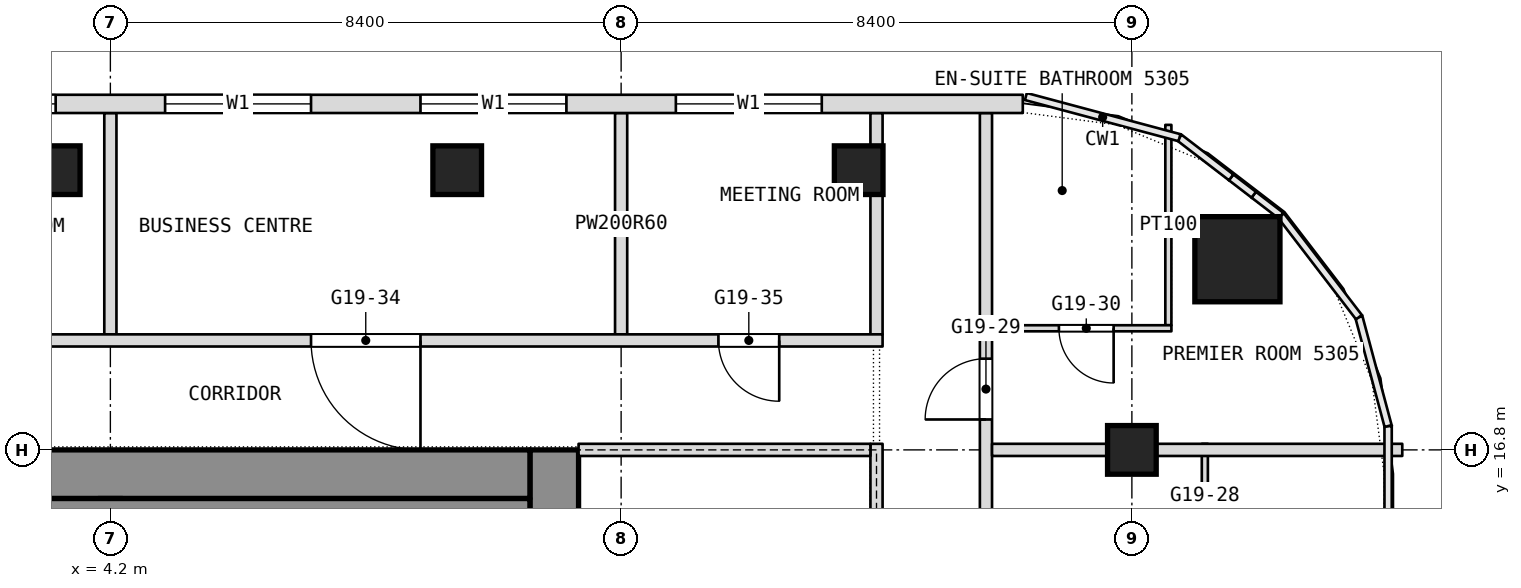
"""IFC4 building model, lengths in metres.
Left out: names, types, materials, properties, quantities, classifications, styles, units other than length and angle.
Written with IfcOpenShell. Run it as: python <this file> out.ifc"""

import sys

from ifc_helpers import new_model, si_unit, direction, frame, frame_2d, origin, origin_2d, place, context, subcontext, project, spatial, rectangle, extrude, element, fill, save


model = new_model("IFC4")
c1 = context("Model", 3, precision=1e-05, world=origin(), true_north=direction((0.0, 1.0)))
c2 = subcontext(c1, "Body", "Model", "MODEL_VIEW")
j1 = project(units=[si_unit("LENGTHUNIT", "METRE"), si_unit("PLANEANGLEUNIT", "RADIAN")], contexts=[c1])
p1 = place(None, origin())
s1 = spatial("IfcSite", under=j1, at=p1, CompositionType="ELEMENT")
p2 = place(p1, origin())
s2 = spatial("IfcBuilding", under=s1, at=p2, CompositionType="ELEMENT")
p3 = place(p2, frame((0.0, 0.0, 227.3)))
s3 = spatial("IfcBuildingStorey", under=s2, at=p3, CompositionType="ELEMENT", Elevation=227.3)
p4 = place(p3, frame((11.5, 0.0, 0.0), z_axis=(0.0, 0.0, 1.0), x_axis=(0.0, 1.0, 0.0)))
e1 = element("IfcWall", 1, at=p4, inside=s3, PredefinedType="SHEAR", context=c2, shape_type="SweptSolid", body=[
    extrude(rectangle(XDim=16.8, YDim=0.8, at=frame_2d((8.4, 0.0))), origin(), (0.0, 0.0, 1.0), 3.6),
])
p5 = place(p4, frame((2.3, 0.0, 0.0)))
e2 = element("IfcOpeningElement", 2, at=p5, cuts=e1, PredefinedType="OPENING", context=c2, shape_type="SweptSolid", body=[
    extrude(rectangle(XDim=1.1, YDim=2.1, at=frame_2d((0.55, 1.05))), frame((0.0, 0.4, 0.0), z_axis=(0.0, -1.0, 0.0), x_axis=(1.0, 0.0, 0.0)), (0.0, 0.0, 1.0), 0.8),
])
p6 = place(p4, frame((4.85, 0.0, 0.0)))
e3 = element("IfcOpeningElement", 3, at=p6, cuts=e1, PredefinedType="OPENING", context=c2, shape_type="SweptSolid", body=[
    extrude(rectangle(XDim=1.1, YDim=2.1, at=frame_2d((0.55, 1.05))), frame((0.0, 0.4, 0.0), z_axis=(0.0, -1.0, 0.0), x_axis=(1.0, 0.0, 0.0)), (0.0, 0.0, 1.0), 0.8),
])
p7 = place(p4, frame((6.825, 0.0, 0.0)))
e4 = element("IfcOpeningElement", 4, at=p7, cuts=e1, PredefinedType="OPENING", context=c2, shape_type="SweptSolid", body=[
    extrude(rectangle(XDim=1.2, YDim=2.1, at=frame_2d((0.6, 1.05))), frame((0.0, 0.4, 0.0), z_axis=(0.0, -1.0, 0.0), x_axis=(1.0, 0.0, 0.0)), (0.0, 0.0, 1.0), 0.8),
])
p8 = place(p4, frame((13.4, 0.0, 0.0)))
e5 = element("IfcOpeningElement", 5, at=p8, cuts=e1, PredefinedType="OPENING", context=c2, shape_type="SweptSolid", body=[
    extrude(rectangle(XDim=1.1, YDim=2.1, at=frame_2d((0.55, 1.05))), frame((0.0, 0.4, 0.0), z_axis=(0.0, -1.0, 0.0), x_axis=(1.0, 0.0, 0.0)), (0.0, 0.0, 1.0), 0.8),
])
p9 = place(p4, frame((10.85, 0.0, 0.0)))
e6 = element("IfcOpeningElement", 6, at=p9, cuts=e1, PredefinedType="OPENING", context=c2, shape_type="SweptSolid", body=[
    extrude(rectangle(XDim=1.1, YDim=2.1, at=frame_2d((0.55, 1.05))), frame((0.0, 0.4, 0.0), z_axis=(0.0, -1.0, 0.0), x_axis=(1.0, 0.0, 0.0)), (0.0, 0.0, 1.0), 0.8),
])
p10 = place(p4, frame((8.775, 0.0, 0.0)))
e7 = element("IfcOpeningElement", 7, at=p10, cuts=e1, PredefinedType="OPENING", context=c2, shape_type="SweptSolid", body=[
    extrude(rectangle(XDim=1.2, YDim=2.1, at=frame_2d((0.6, 1.05))), frame((0.0, 0.4, 0.0), z_axis=(0.0, -1.0, 0.0), x_axis=(1.0, 0.0, 0.0)), (0.0, 0.0, 1.0), 0.8),
])
p11 = place(p3, frame((-11.1, 16.4, 0.0), z_axis=(0.0, 0.0, 1.0), x_axis=(1.0, 0.0, 0.0)))
e8 = element("IfcWall", 8, at=p11, inside=s3, PredefinedType="SHEAR", context=c2, shape_type="SweptSolid", body=[
    extrude(rectangle(XDim=22.2, YDim=0.8, at=frame_2d((11.1, 0.0))), origin(), (0.0, 0.0, 1.0), 3.6),
])
p12 = place(p3, frame((4.2, 0.8, 0.0), z_axis=(0.0, 0.0, 1.0), x_axis=(0.0, 1.0, 0.0)))
e9 = element("IfcWall", 9, at=p12, inside=s3, PredefinedType="SHEAR", context=c2, shape_type="SweptSolid", body=[
    extrude(rectangle(XDim=15.2, YDim=0.4, at=frame_2d((7.6, 0.0))), origin(), (0.0, 0.0, 1.0), 3.6),
])
p13 = place(p12, frame((5.95, 0.0, 0.0)))
e10 = element("IfcOpeningElement", 10, at=p13, cuts=e9, PredefinedType="OPENING", context=c2, shape_type="SweptSolid", body=[
    extrude(rectangle(XDim=1.2, YDim=2.1, at=frame_2d((0.6, 1.05))), frame((0.0, 0.2, 0.0), z_axis=(0.0, -1.0, 0.0), x_axis=(1.0, 0.0, 0.0)), (0.0, 0.0, 1.0), 0.4),
])
p14 = place(p3, frame((22.736, 19.936, 0.0), z_axis=(0.0, 0.0, 1.0), x_axis=(1.0, 0.0, 0.0)))
e11 = element("IfcColumn", 11, at=p14, inside=s3, PredefinedType="COLUMN", context=c2, shape_type="SweptSolid", body=[
    extrude(rectangle(XDim=1.4, YDim=1.4, at=origin_2d()), origin(), (0.0, 0.0, 1.0), 3.6),
])
for number, where, z_axis, x_axis in (
    (12, (21.0, 16.8, 0.0), (0.0, 0.0, 1.0), (1.0, 0.0, 0.0)),
    (13, (3.302, 21.4, 0.0), (0.0, 0.0, 1.0), (1.0, 0.0, 0.0)),
    (14, (9.904, 21.4, 0.0), (0.0, 0.0, 1.0), (1.0, 0.0, 0.0)),
    (15, (16.507, 21.4, 0.0), (0.0, 0.0, 1.0), (1.0, 0.0, 0.0)),
):
    element("IfcColumn", number, at=place(p3, frame(where, z_axis=z_axis, x_axis=x_axis)), inside=s3, PredefinedType="COLUMN", context=c2, shape_type="SweptSolid", body=[
        extrude(rectangle(XDim=0.8, YDim=0.8, at=origin_2d()), origin(), (0.0, 0.0, 1.0), 3.6),
    ])
p15 = place(p3, frame((22.2, 14.45, 0.0), z_axis=(0.0, 0.0, 1.0), x_axis=(0.0, 1.0, 0.0)))
e16 = element("IfcWall", 16, at=p15, inside=s3, PredefinedType="PARTITIONING", context=c2, shape_type="SweptSolid", body=[
    extrude(rectangle(XDim=2.45, YDim=0.1, at=frame_2d((1.225, 0.0))), origin(), (0.0, 0.0, 1.0), 3.34),
])
p16 = place(p15, frame((0.15, 0.0, 0.0)))
e17 = element("IfcOpeningElement", 17, at=p16, cuts=e16, PredefinedType="OPENING", context=c2, shape_type="SweptSolid", body=[
    extrude(rectangle(XDim=0.9, YDim=2.1, at=frame_2d((0.45, 1.05))), frame((0.0, 0.05, 0.0), z_axis=(0.0, -1.0, 0.0), x_axis=(1.0, 0.0, 0.0)), (0.0, 0.0, 1.0), 0.1),
])
p17 = place(p3, frame((21.6, 18.85, 0.0), z_axis=(0.0, 0.0, 1.0), x_axis=(0.0, 1.0, 0.0)))
e18 = element("IfcWall", 18, at=p17, inside=s3, PredefinedType="PARTITIONING", context=c2, shape_type="SweptSolid", body=[
    extrude(rectangle(XDim=3.295, YDim=0.1, at=frame_2d((1.647, 0.0))), origin(), (0.0, 0.0, 1.0), 3.34),
])
p18 = place(p3, frame((18.6, -26.751, 0.0), z_axis=(0.0, 0.0, 1.0), x_axis=(0.0, 1.0, 0.0)))
e19 = element("IfcWall", 19, at=p18, inside=s3, PredefinedType="PARTITIONING", context=c2, shape_type="SweptSolid", body=[
    extrude(rectangle(XDim=49.091, YDim=0.2, at=frame_2d((24.545, 0.0))), origin(), (0.0, 0.0, 1.0), 3.34),
])
p19 = place(p18, frame((4.226, 0.0, 0.0)))
e20 = element("IfcOpeningElement", 20, at=p19, cuts=e19, PredefinedType="OPENING", context=c2, shape_type="SweptSolid", body=[
    extrude(rectangle(XDim=1.8, YDim=2.1, at=frame_2d((0.9, 1.05))), frame((0.0, 0.1, 0.0), z_axis=(0.0, -1.0, 0.0), x_axis=(1.0, 0.0, 0.0)), (0.0, 0.0, 1.0), 0.2),
])
p20 = place(p18, frame((10.351, 0.0, 0.0)))
e21 = element("IfcOpeningElement", 21, at=p20, cuts=e19, PredefinedType="OPENING", context=c2, shape_type="SweptSolid", body=[
    extrude(rectangle(XDim=1.0, YDim=2.1, at=frame_2d((0.5, 1.05))), frame((0.0, 0.1, 0.0), z_axis=(0.0, -1.0, 0.0), x_axis=(1.0, 0.0, 0.0)), (0.0, 0.0, 1.0), 0.2),
])
p21 = place(p18, frame((16.951, 0.0, 0.0)))
e22 = element("IfcOpeningElement", 22, at=p21, cuts=e19, PredefinedType="OPENING", context=c2, shape_type="SweptSolid", body=[
    extrude(rectangle(XDim=1.0, YDim=2.1, at=frame_2d((0.5, 1.05))), frame((0.0, 0.1, 0.0), z_axis=(0.0, -1.0, 0.0), x_axis=(1.0, 0.0, 0.0)), (0.0, 0.0, 1.0), 0.2),
])
p22 = place(p18, frame((22.051, 0.0, 0.0)))
e23 = element("IfcOpeningElement", 23, at=p22, cuts=e19, PredefinedType="OPENING", context=c2, shape_type="SweptSolid", body=[
    extrude(rectangle(XDim=1.1, YDim=2.1, at=frame_2d((0.55, 1.05))), frame((0.0, 0.1, 0.0), z_axis=(0.0, -1.0, 0.0), x_axis=(1.0, 0.0, 0.0)), (0.0, 0.0, 1.0), 0.2),
])
p23 = place(p18, frame((30.051, 0.0, 0.0)))
e24 = element("IfcOpeningElement", 24, at=p23, cuts=e19, PredefinedType="OPENING", context=c2, shape_type="SweptSolid", body=[
    extrude(rectangle(XDim=1.8, YDim=2.1, at=frame_2d((0.9, 1.05))), frame((0.0, 0.1, 0.0), z_axis=(0.0, -1.0, 0.0), x_axis=(1.0, 0.0, 0.0)), (0.0, 0.0, 1.0), 0.2),
])
p24 = place(p18, frame((38.851, 0.0, 0.0)))
e25 = element("IfcOpeningElement", 25, at=p24, cuts=e19, PredefinedType="OPENING", context=c2, shape_type="SweptSolid", body=[
    extrude(rectangle(XDim=1.1, YDim=2.1, at=frame_2d((0.55, 1.05))), frame((0.0, 0.1, 0.0), z_axis=(0.0, -1.0, 0.0), x_axis=(1.0, 0.0, 0.0)), (0.0, 0.0, 1.0), 0.2),
])
p25 = place(p18, frame((44.051, 0.0, 0.0)))
e26 = element("IfcOpeningElement", 26, at=p25, cuts=e19, PredefinedType="OPENING", context=c2, shape_type="SweptSolid", body=[
    extrude(rectangle(XDim=1.0, YDim=2.1, at=frame_2d((0.5, 1.05))), frame((0.0, 0.1, 0.0), z_axis=(0.0, -1.0, 0.0), x_axis=(1.0, 0.0, 0.0)), (0.0, 0.0, 1.0), 0.2),
])
for number, where, z_axis, x_axis in (
    (27, (16.8, 18.7, 0.0), (0.0, 0.0, 1.0), (0.0, 1.0, 0.0)),
    (28, (12.6, 18.7, 0.0), (0.0, 0.0, 1.0), (0.0, 1.0, 0.0)),
    (29, (4.2, 18.7, 0.0), (0.0, 0.0, 1.0), (0.0, 1.0, 0.0)),
):
    element("IfcWall", number, at=place(p3, frame(where, z_axis=z_axis, x_axis=x_axis)), inside=s3, PredefinedType="PARTITIONING", context=c2, shape_type="SweptSolid", body=[
        extrude(rectangle(XDim=3.64, YDim=0.2, at=frame_2d((1.82, 0.0))), origin(), (0.0, 0.0, 1.0), 3.34),
    ])
p26 = place(p3, frame((18.7, 16.8, 0.0), z_axis=(0.0, 0.0, 1.0), x_axis=(1.0, 0.0, 0.0)))
e30 = element("IfcWall", 30, at=p26, inside=s3, PredefinedType="PARTITIONING", context=c2, shape_type="SweptSolid", body=[
    extrude(rectangle(XDim=6.747, YDim=0.2, at=frame_2d((3.374, 0.0))), origin(), (0.0, 0.0, 1.0), 2.94),
])
p27 = place(p3, frame((-16.9, 18.6, 0.0), z_axis=(0.0, 0.0, 1.0), x_axis=(1.0, 0.0, 0.0)))
e31 = element("IfcWall", 31, at=p27, inside=s3, PredefinedType="PARTITIONING", context=c2, shape_type="SweptSolid", body=[
    extrude(rectangle(XDim=33.8, YDim=0.2, at=frame_2d((16.9, 0.0))), origin(), (0.0, 0.0, 1.0), 3.34),
])
p28 = place(p27, frame((1.7, 0.0, 0.0)))
e32 = element("IfcOpeningElement", 32, at=p28, cuts=e31, PredefinedType="OPENING", context=c2, shape_type="SweptSolid", body=[
    extrude(rectangle(XDim=1.0, YDim=2.1, at=frame_2d((0.5, 1.05))), frame((0.0, 0.1, 0.0), z_axis=(0.0, -1.0, 0.0), x_axis=(1.0, 0.0, 0.0)), (0.0, 0.0, 1.0), 0.2),
])
p29 = place(p27, frame((7.6, 0.0, 0.0)))
e33 = element("IfcOpeningElement", 33, at=p29, cuts=e31, PredefinedType="OPENING", context=c2, shape_type="SweptSolid", body=[
    extrude(rectangle(XDim=1.8, YDim=2.1, at=frame_2d((0.9, 1.05))), frame((0.0, 0.1, 0.0), z_axis=(0.0, -1.0, 0.0), x_axis=(1.0, 0.0, 0.0)), (0.0, 0.0, 1.0), 0.2),
])
p30 = place(p27, frame((16.0, 0.0, 0.0)))
e34 = element("IfcOpeningElement", 34, at=p30, cuts=e31, PredefinedType="OPENING", context=c2, shape_type="SweptSolid", body=[
    extrude(rectangle(XDim=1.8, YDim=2.1, at=frame_2d((0.9, 1.05))), frame((0.0, 0.1, 0.0), z_axis=(0.0, -1.0, 0.0), x_axis=(1.0, 0.0, 0.0)), (0.0, 0.0, 1.0), 0.2),
])
p31 = place(p27, frame((24.4, 0.0, 0.0)))
e35 = element("IfcOpeningElement", 35, at=p31, cuts=e31, PredefinedType="OPENING", context=c2, shape_type="SweptSolid", body=[
    extrude(rectangle(XDim=1.8, YDim=2.1, at=frame_2d((0.9, 1.05))), frame((0.0, 0.1, 0.0), z_axis=(0.0, -1.0, 0.0), x_axis=(1.0, 0.0, 0.0)), (0.0, 0.0, 1.0), 0.2),
])
p32 = place(p27, frame((31.1, 0.0, 0.0)))
e36 = element("IfcOpeningElement", 36, at=p32, cuts=e31, PredefinedType="OPENING", context=c2, shape_type="SweptSolid", body=[
    extrude(rectangle(XDim=1.0, YDim=2.1, at=frame_2d((0.5, 1.05))), frame((0.0, 0.1, 0.0), z_axis=(0.0, -1.0, 0.0), x_axis=(1.0, 0.0, 0.0)), (0.0, 0.0, 1.0), 0.2),
])
p33 = place(p3, frame((18.7, 18.8, 0.0), z_axis=(0.0, 0.0, 1.0), x_axis=(1.0, 0.0, 0.0)))
e37 = element("IfcWall", 37, at=p33, inside=s3, PredefinedType="PARTITIONING", context=c2, shape_type="SweptSolid", body=[
    extrude(rectangle(XDim=2.95, YDim=0.1, at=frame_2d((1.475, 0.0))), origin(), (0.0, 0.0, 1.0), 3.34),
])
p34 = place(p33, frame((1.1, 0.0, 0.0)))
e38 = element("IfcOpeningElement", 38, at=p34, cuts=e37, PredefinedType="OPENING", context=c2, shape_type="SweptSolid", body=[
    extrude(rectangle(XDim=0.9, YDim=2.1, at=frame_2d((0.45, 1.05))), frame((0.0, 0.05, 0.0), z_axis=(0.0, -1.0, 0.0), x_axis=(1.0, 0.0, 0.0)), (0.0, 0.0, 1.0), 0.1),
])
p35 = place(p3, frame((19.206, 22.49, 0.0), z_axis=(0.0, 0.0, 1.0), x_axis=(-1.0, 0.0, 0.0)))
e39 = element("IfcWall", 39, at=p35, inside=s3, PredefinedType="NOTDEFINED", context=c2, shape_type="SweptSolid", body=[
    extrude(rectangle(XDim=38.412, YDim=0.3, at=frame_2d((19.206, 0.0))), origin(), (0.0, 0.0, 1.0), 3.6),
])
p36 = place(p35, frame((3.306, 0.0, 0.9)))
e40 = element("IfcOpeningElement", 40, at=p36, cuts=e39, PredefinedType="OPENING", context=c2, shape_type="SweptSolid", body=[
    extrude(rectangle(XDim=2.4, YDim=2.1, at=frame_2d((1.2, 1.05))), frame((0.0, 0.15, 0.0), z_axis=(0.0, -1.0, 0.0), x_axis=(1.0, 0.0, 0.0)), (0.0, 0.0, 1.0), 0.3),
])
p37 = place(p35, frame((7.506, 0.0, 0.9)))
e41 = element("IfcOpeningElement", 41, at=p37, cuts=e39, PredefinedType="OPENING", context=c2, shape_type="SweptSolid", body=[
    extrude(rectangle(XDim=2.4, YDim=2.1, at=frame_2d((1.2, 1.05))), frame((0.0, 0.15, 0.0), z_axis=(0.0, -1.0, 0.0), x_axis=(1.0, 0.0, 0.0)), (0.0, 0.0, 1.0), 0.3),
])
p38 = place(p35, frame((11.706, 0.0, 0.9)))
e42 = element("IfcOpeningElement", 42, at=p38, cuts=e39, PredefinedType="OPENING", context=c2, shape_type="SweptSolid", body=[
    extrude(rectangle(XDim=2.4, YDim=2.1, at=frame_2d((1.2, 1.05))), frame((0.0, 0.15, 0.0), z_axis=(0.0, -1.0, 0.0), x_axis=(1.0, 0.0, 0.0)), (0.0, 0.0, 1.0), 0.3),
])
p39 = place(p35, frame((15.906, 0.0, 0.9)))
e43 = element("IfcOpeningElement", 43, at=p39, cuts=e39, PredefinedType="OPENING", context=c2, shape_type="SweptSolid", body=[
    extrude(rectangle(XDim=2.4, YDim=2.1, at=frame_2d((1.2, 1.05))), frame((0.0, 0.15, 0.0), z_axis=(0.0, -1.0, 0.0), x_axis=(1.0, 0.0, 0.0)), (0.0, 0.0, 1.0), 0.3),
])
p40 = place(p35, frame((20.106, 0.0, 0.9)))
e44 = element("IfcOpeningElement", 44, at=p40, cuts=e39, PredefinedType="OPENING", context=c2, shape_type="SweptSolid", body=[
    extrude(rectangle(XDim=2.4, YDim=2.1, at=frame_2d((1.2, 1.05))), frame((0.0, 0.15, 0.0), z_axis=(0.0, -1.0, 0.0), x_axis=(1.0, 0.0, 0.0)), (0.0, 0.0, 1.0), 0.3),
])
p41 = place(p35, frame((24.306, 0.0, 0.9)))
e45 = element("IfcOpeningElement", 45, at=p41, cuts=e39, PredefinedType="OPENING", context=c2, shape_type="SweptSolid", body=[
    extrude(rectangle(XDim=2.4, YDim=2.1, at=frame_2d((1.2, 1.05))), frame((0.0, 0.15, 0.0), z_axis=(0.0, -1.0, 0.0), x_axis=(1.0, 0.0, 0.0)), (0.0, 0.0, 1.0), 0.3),
])
p42 = place(p35, frame((28.506, 0.0, 0.9)))
e46 = element("IfcOpeningElement", 46, at=p42, cuts=e39, PredefinedType="OPENING", context=c2, shape_type="SweptSolid", body=[
    extrude(rectangle(XDim=2.4, YDim=2.1, at=frame_2d((1.2, 1.05))), frame((0.0, 0.15, 0.0), z_axis=(0.0, -1.0, 0.0), x_axis=(1.0, 0.0, 0.0)), (0.0, 0.0, 1.0), 0.3),
])
p43 = place(p35, frame((32.706, 0.0, 0.9)))
e47 = element("IfcOpeningElement", 47, at=p43, cuts=e39, PredefinedType="OPENING", context=c2, shape_type="SweptSolid", body=[
    extrude(rectangle(XDim=2.4, YDim=2.1, at=frame_2d((1.2, 1.05))), frame((0.0, 0.15, 0.0), z_axis=(0.0, -1.0, 0.0), x_axis=(1.0, 0.0, 0.0)), (0.0, 0.0, 1.0), 0.3),
])
p44 = place(p3, frame((-11.1, 15.65, 0.0), z_axis=(0.0, 0.0, 1.0), x_axis=(1.0, 0.0, 0.0)))
e48 = element("IfcWall", 48, at=p44, inside=s3, PredefinedType="PARTITIONING", context=c2, shape_type="SweptSolid", body=[
    extrude(rectangle(XDim=22.2, YDim=0.7, at=frame_2d((11.1, 0.0))), origin(), (0.0, 0.0, 1.0), 3.34),
])
p45 = place(p3, frame((16.8, -0.1, 0.0), z_axis=(0.0, 0.0, 1.0), x_axis=(0.0, 1.0, 0.0)))
e49 = element("IfcWall", 49, at=p45, inside=s3, PredefinedType="PARTITIONING", context=c2, shape_type="SweptSolid", body=[
    extrude(rectangle(XDim=17.0, YDim=0.2, at=frame_2d((8.5, 0.0))), origin(), (0.0, 0.0, 1.0), 3.34),
])
p46 = place(p45, frame((2.2, 0.0, 0.0)))
e50 = element("IfcOpeningElement", 50, at=p46, cuts=e49, PredefinedType="OPENING", context=c2, shape_type="SweptSolid", body=[
    extrude(rectangle(XDim=1.8, YDim=2.1, at=frame_2d((0.9, 1.05))), frame((0.0, 0.1, 0.0), z_axis=(0.0, -1.0, 0.0), x_axis=(1.0, 0.0, 0.0)), (0.0, 0.0, 1.0), 0.2),
])
p47 = place(p45, frame((13.0, 0.0, 0.0)))
e51 = element("IfcOpeningElement", 51, at=p47, cuts=e49, PredefinedType="OPENING", context=c2, shape_type="SweptSolid", body=[
    extrude(rectangle(XDim=1.8, YDim=2.1, at=frame_2d((0.9, 1.05))), frame((0.0, 0.1, 0.0), z_axis=(0.0, -1.0, 0.0), x_axis=(1.0, 0.0, 0.0)), (0.0, 0.0, 1.0), 0.2),
])
p48 = place(p3, frame((11.9, 16.8, 0.0), z_axis=(0.0, 0.0, 1.0), x_axis=(1.0, 0.0, 0.0)))
e52 = element("IfcWall", 52, at=p48, inside=s3, PredefinedType="PARTITIONING", context=c2, shape_type="SweptSolid", body=[
    extrude(rectangle(XDim=4.8, YDim=0.2, at=frame_2d((2.4, 0.0))), origin(), (0.0, 0.0, 1.0), 2.94),
])
p49 = place(p25, origin())
e53 = element("IfcDoor", 53, at=p49, inside=s3, OperationType="SINGLE_SWING_LEFT", PredefinedType="DOOR", context=c2, shape_type="SweptSolid", body=[
    extrude(rectangle(XDim=1.0, YDim=2.1, at=frame_2d((0.5, 1.05))), frame((0.0, 0.025, 0.0), z_axis=(0.0, -1.0, 0.0), x_axis=(1.0, 0.0, 0.0)), (0.0, 0.0, 1.0), 0.05),
])
fill(e26, e53)
p50 = place(p31, origin())
e54 = element("IfcDoor", 54, at=p50, inside=s3, OperationType="DOUBLE_DOOR_SINGLE_SWING", PredefinedType="DOOR", context=c2, shape_type="SweptSolid", body=[
    extrude(rectangle(XDim=1.8, YDim=2.1, at=frame_2d((0.9, 1.05))), frame((0.0, 0.025, 0.0), z_axis=(0.0, -1.0, 0.0), x_axis=(1.0, 0.0, 0.0)), (0.0, 0.0, 1.0), 0.05),
])
fill(e35, e54)
p51 = place(p32, origin())
e55 = element("IfcDoor", 55, at=p51, inside=s3, OperationType="SINGLE_SWING_LEFT", PredefinedType="DOOR", context=c2, shape_type="SweptSolid", body=[
    extrude(rectangle(XDim=1.0, YDim=2.1, at=frame_2d((0.5, 1.05))), frame((0.0, 0.025, 0.0), z_axis=(0.0, -1.0, 0.0), x_axis=(1.0, 0.0, 0.0)), (0.0, 0.0, 1.0), 0.05),
])
fill(e36, e55)
p52 = place(p34, origin())
e56 = element("IfcDoor", 56, at=p52, inside=s3, OperationType="SINGLE_SWING_RIGHT", PredefinedType="DOOR", context=c2, shape_type="SweptSolid", body=[
    extrude(rectangle(XDim=0.9, YDim=2.1, at=frame_2d((0.45, 1.05))), frame((0.0, 0.025, 0.0), z_axis=(0.0, -1.0, 0.0), x_axis=(1.0, 0.0, 0.0)), (0.0, 0.0, 1.0), 0.05),
])
fill(e38, e56)
p53 = place(p36, origin())
e57 = element("IfcWindow", 57, at=p53, inside=s3, PartitioningType="SINGLE_PANEL", PredefinedType="WINDOW", context=c2, shape_type="SweptSolid", body=[
    extrude(rectangle(XDim=2.4, YDim=2.1, at=frame_2d((1.2, 1.05))), frame((0.0, 0.03, 0.0), z_axis=(0.0, -1.0, 0.0), x_axis=(1.0, 0.0, 0.0)), (0.0, 0.0, 1.0), 0.06),
])
fill(e40, e57)
p54 = place(p37, origin())
e58 = element("IfcWindow", 58, at=p54, inside=s3, PartitioningType="SINGLE_PANEL", PredefinedType="WINDOW", context=c2, shape_type="SweptSolid", body=[
    extrude(rectangle(XDim=2.4, YDim=2.1, at=frame_2d((1.2, 1.05))), frame((0.0, 0.03, 0.0), z_axis=(0.0, -1.0, 0.0), x_axis=(1.0, 0.0, 0.0)), (0.0, 0.0, 1.0), 0.06),
])
fill(e41, e58)
p55 = place(p38, origin())
e59 = element("IfcWindow", 59, at=p55, inside=s3, PartitioningType="SINGLE_PANEL", PredefinedType="WINDOW", context=c2, shape_type="SweptSolid", body=[
    extrude(rectangle(XDim=2.4, YDim=2.1, at=frame_2d((1.2, 1.05))), frame((0.0, 0.03, 0.0), z_axis=(0.0, -1.0, 0.0), x_axis=(1.0, 0.0, 0.0)), (0.0, 0.0, 1.0), 0.06),
])
fill(e42, e59)
p56 = place(p39, origin())
e60 = element("IfcWindow", 60, at=p56, inside=s3, PartitioningType="SINGLE_PANEL", PredefinedType="WINDOW", context=c2, shape_type="SweptSolid", body=[
    extrude(rectangle(XDim=2.4, YDim=2.1, at=frame_2d((1.2, 1.05))), frame((0.0, 0.03, 0.0), z_axis=(0.0, -1.0, 0.0), x_axis=(1.0, 0.0, 0.0)), (0.0, 0.0, 1.0), 0.06),
])
fill(e43, e60)
save(model, sys.argv[1])
